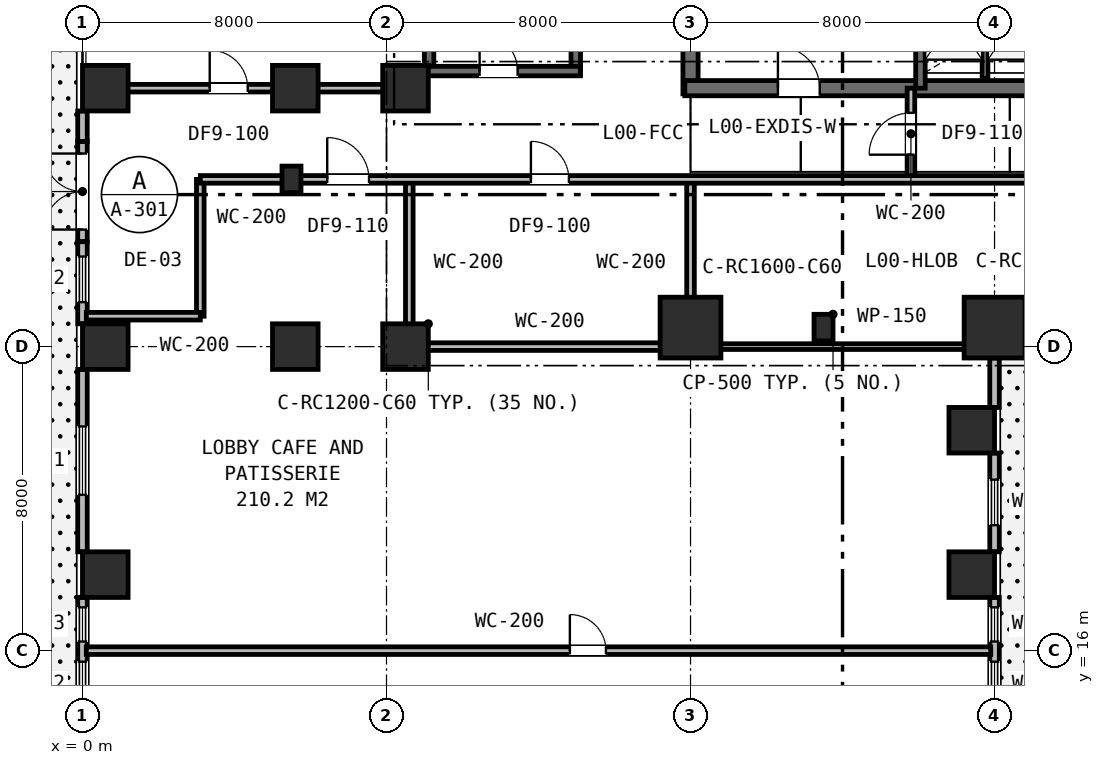
"""IFC4 building model, lengths in metres.
Left out: names, types, materials, properties, quantities, classifications, styles, units other than length and angle.
Written with IfcOpenShell. Run it as: python <this file> out.ifc"""

import sys

from ifc_helpers import new_model, si_unit, direction, frame, frame_2d, origin, origin_2d, place, context, subcontext, project, spatial, rectangle, extrude, element, fill, save


model = new_model("IFC4")
c1 = context("Model", 3, precision=1e-05, world=origin(), true_north=direction((0.0, 1.0)))
c2 = subcontext(c1, "Body", "Model", "MODEL_VIEW")
j1 = project(units=[si_unit("LENGTHUNIT", "METRE"), si_unit("PLANEANGLEUNIT", "RADIAN")], contexts=[c1])
p1 = place(None, origin())
s1 = spatial("IfcSite", under=j1, at=p1, CompositionType="ELEMENT")
p2 = place(p1, origin())
s2 = spatial("IfcBuilding", under=s1, at=p2, CompositionType="ELEMENT")
p3 = place(p2, origin())
s3 = spatial("IfcBuildingStorey", under=s2, at=p3, CompositionType="ELEMENT", Elevation=0.0)
p4 = place(p3, frame((16.0, 30.65, 0.0), z_axis=(0.0, 0.0, 1.0), x_axis=(0.0, 1.0, 0.0)))
e1 = element("IfcWall", 1, at=p4, inside=s3, PredefinedType="SHEAR", context=c2, shape_type="SweptSolid", body=[
    extrude(rectangle(XDim=12.3, YDim=0.4, at=frame_2d((6.15, 0.0))), origin(), (0.0, 0.0, 1.0), 6.0),
])
p5 = place(p3, frame((15.85, 30.8, 0.0), z_axis=(0.0, 0.0, 1.0), x_axis=(1.0, 0.0, 0.0)))
e2 = element("IfcWall", 2, at=p5, inside=s3, PredefinedType="SHEAR", context=c2, shape_type="SweptSolid", body=[
    extrude(rectangle(XDim=11.2, YDim=0.4, at=frame_2d((5.6, 0.0))), origin(), (0.0, 0.0, 1.0), 6.0),
])
p6 = place(p5, frame((2.45, 0.0, 0.0)))
e3 = element("IfcOpeningElement", 3, at=p6, cuts=e2, PredefinedType="OPENING", context=c2, shape_type="SweptSolid", body=[
    extrude(rectangle(XDim=1.1, YDim=2.15, at=frame_2d((0.55, 1.075))), frame((0.0, 0.21, 0.0), z_axis=(0.0, -1.0, 0.0), x_axis=(1.0, 0.0, 0.0)), (0.0, 0.0, 1.0), 0.42),
])
p7 = place(p3, frame((22.05, 30.8, 0.0), z_axis=(0.0, 0.0, 1.0), x_axis=(0.0, 1.0, 0.0)))
e4 = element("IfcWall", 4, at=p7, inside=s3, PredefinedType="SHEAR", context=c2, shape_type="SweptSolid", body=[
    extrude(rectangle(XDim=6.45, YDim=0.25, at=frame_2d((3.225, 0.0))), origin(), (0.0, 0.0, 1.0), 6.0),
])
for number, where, z_axis, x_axis in (
    (5, (9.12, 31.15, 0.0), (0.0, 0.0, 1.0), (0.0, 1.0, 0.0)),
    (6, (12.98, 31.15, 0.0), (0.0, 0.0, 1.0), (0.0, 1.0, 0.0)),
):
    element("IfcWall", number, at=place(p3, frame(where, z_axis=z_axis, x_axis=x_axis)), inside=s3, PredefinedType="SHEAR", context=c2, shape_type="SweptSolid", body=[
        extrude(rectangle(XDim=8.8, YDim=0.25, at=frame_2d((4.4, 0.0))), origin(), (0.0, 0.0, 1.0), 6.0),
    ])
p8 = place(p3, frame((9.0, 31.25, 0.0), z_axis=(0.0, 0.0, 1.0), x_axis=(1.0, 0.0, 0.0)))
e7 = element("IfcWall", 7, at=p8, inside=s3, PredefinedType="SHEAR", context=c2, shape_type="SweptSolid", body=[
    extrude(rectangle(XDim=4.1, YDim=0.25, at=frame_2d((2.05, 0.0))), origin(), (0.0, 0.0, 1.0), 6.0),
])
p9 = place(p8, frame((1.45, 0.0, 0.0)))
e8 = element("IfcOpeningElement", 8, at=p9, cuts=e7, PredefinedType="OPENING", context=c2, shape_type="SweptSolid", body=[
    extrude(rectangle(XDim=1.0, YDim=2.15, at=frame_2d((0.5, 1.075))), frame((0.0, 0.135, 0.0), z_axis=(0.0, -1.0, 0.0), x_axis=(1.0, 0.0, 0.0)), (0.0, 0.0, 1.0), 0.27),
])
p10 = place(p3, frame((8.5, 24.0, 0.0), z_axis=(0.0, 0.0, 1.0), x_axis=(1.0, 0.0, 0.0)))
e9 = element("IfcColumn", 9, at=p10, inside=s3, PredefinedType="COLUMN", context=c2, shape_type="SweptSolid", body=[
    extrude(rectangle(XDim=1.2, YDim=1.2, at=origin_2d()), origin(), (0.0, 0.0, 1.0), 6.0),
])
for number, where, z_axis, x_axis in (
    (10, (16.0, 24.5, 0.0), (0.0, 0.0, 1.0), (1.0, 0.0, 0.0)),
    (11, (24.0, 24.5, 0.0), (0.0, 0.0, 1.0), (1.0, 0.0, 0.0)),
):
    element("IfcColumn", number, at=place(p3, frame(where, z_axis=z_axis, x_axis=x_axis)), inside=s3, PredefinedType="COLUMN", context=c2, shape_type="SweptSolid", body=[
        extrude(rectangle(XDim=1.6, YDim=1.6, at=origin_2d()), origin(), (0.0, 0.0, 1.0), 6.0),
    ])
for number, where, z_axis, x_axis in (
    (12, (5.6, 24.0, 0.0), (0.0, 0.0, 1.0), (1.0, 0.0, 0.0)),
    (13, (5.6, 30.8, 0.0), (0.0, 0.0, 1.0), (1.0, 0.0, 0.0)),
    (14, (8.5, 30.8, 0.0), (0.0, 0.0, 1.0), (1.0, 0.0, 0.0)),
    (15, (0.6, 24.0, 0.0), (0.0, 0.0, 1.0), (1.0, 0.0, 0.0)),
    (16, (0.6, 30.8, 0.0), (0.0, 0.0, 1.0), (1.0, 0.0, 0.0)),
    (17, (0.6, 18.0, 0.0), (0.0, 0.0, 1.0), (1.0, 0.0, 0.0)),
    (18, (23.4, 18.0, 0.0), (0.0, 0.0, 1.0), (1.0, 0.0, 0.0)),
    (19, (23.4, 21.8, 0.0), (0.0, 0.0, 1.0), (1.0, 0.0, 0.0)),
):
    element("IfcColumn", number, at=place(p3, frame(where, z_axis=z_axis, x_axis=x_axis)), inside=s3, PredefinedType="COLUMN", context=c2, shape_type="SweptSolid", body=[
        extrude(rectangle(XDim=1.2, YDim=1.2, at=origin_2d()), origin(), (0.0, 0.0, 1.0), 6.0),
    ])
p11 = place(p3, frame((24.0, 14.2, 0.0), z_axis=(0.0, 0.0, 1.0), x_axis=(0.0, 1.0, 0.0)))
e20 = element("IfcWall", 20, at=p11, inside=s3, PredefinedType="STANDARD", context=c2, shape_type="SweptSolid", body=[
    extrude(rectangle(XDim=3.2, YDim=0.25, at=frame_2d((1.6, 0.0))), origin(), (0.0, 0.0, 1.0), 5.67),
])
p12 = place(p11, frame((0.31, 0.0, 0.85)))
e21 = element("IfcOpeningElement", 21, at=p12, cuts=e20, PredefinedType="OPENING", context=c2, shape_type="SweptSolid", body=[
    extrude(rectangle(XDim=1.2, YDim=1.6, at=frame_2d((0.6, 0.8))), frame((0.0, 0.135, 0.0), z_axis=(0.0, -1.0, 0.0), x_axis=(1.0, 0.0, 0.0)), (0.0, 0.0, 1.0), 0.27),
])
p13 = place(p11, frame((2.04, 0.0, 0.9)))
e22 = element("IfcOpeningElement", 22, at=p13, cuts=e20, PredefinedType="OPENING", context=c2, shape_type="SweptSolid", body=[
    extrude(rectangle(XDim=0.9, YDim=1.55, at=frame_2d((0.45, 0.775))), frame((0.0, 0.135, 0.0), z_axis=(0.0, -1.0, 0.0), x_axis=(1.0, 0.0, 0.0)), (0.0, 0.0, 1.0), 0.27),
])
p14 = place(p3, frame((24.0, 18.6, 0.0), z_axis=(0.0, 0.0, 1.0), x_axis=(0.0, 1.0, 0.0)))
e23 = element("IfcWall", 23, at=p14, inside=s3, PredefinedType="STANDARD", context=c2, shape_type="SweptSolid", body=[
    extrude(rectangle(XDim=2.6, YDim=0.25, at=frame_2d((1.3, 0.0))), origin(), (0.0, 0.0, 1.0), 5.67),
])
p15 = place(p14, frame((0.7, 0.0, 0.85)))
e24 = element("IfcOpeningElement", 24, at=p15, cuts=e23, PredefinedType="OPENING", context=c2, shape_type="SweptSolid", body=[
    extrude(rectangle(XDim=1.2, YDim=1.6, at=frame_2d((0.6, 0.8))), frame((0.0, 0.135, 0.0), z_axis=(0.0, -1.0, 0.0), x_axis=(1.0, 0.0, 0.0)), (0.0, 0.0, 1.0), 0.27),
])
p16 = place(p3, frame((24.0, 22.4, 0.0), z_axis=(0.0, 0.0, 1.0), x_axis=(0.0, 1.0, 0.0)))
e25 = element("IfcWall", 25, at=p16, inside=s3, PredefinedType="STANDARD", context=c2, shape_type="SweptSolid", body=[
    extrude(rectangle(XDim=1.3, YDim=0.25, at=frame_2d((0.65, 0.0))), origin(), (0.0, 0.0, 1.0), 5.67),
])
p17 = place(p3, frame((0.0, 26.76, 0.0), z_axis=(0.0, 0.0, 1.0), x_axis=(0.0, 1.0, 0.0)))
e26 = element("IfcWall", 26, at=p17, inside=s3, PredefinedType="STANDARD", context=c2, shape_type="SweptSolid", body=[
    extrude(rectangle(XDim=2.64, YDim=0.25, at=frame_2d((1.32, 0.0))), origin(), (0.0, 0.0, 1.0), 5.67),
])
p18 = place(p17, frame((0.32, 0.0, 0.0)))
e27 = element("IfcOpeningElement", 27, at=p18, cuts=e26, PredefinedType="OPENING", context=c2, shape_type="SweptSolid", body=[
    extrude(rectangle(XDim=2.0, YDim=2.4, at=frame_2d((1.0, 1.2))), frame((0.0, 0.135, 0.0), z_axis=(0.0, -1.0, 0.0), x_axis=(1.0, 0.0, 0.0)), (0.0, 0.0, 1.0), 0.27),
])
p19 = place(p3, frame((0.0, 30.2, 0.0), z_axis=(0.0, 0.0, 1.0), x_axis=(0.0, -1.0, 0.0)))
e28 = element("IfcWall", 28, at=p19, inside=s3, PredefinedType="STANDARD", context=c2, shape_type="SweptSolid", body=[
    extrude(rectangle(XDim=0.8, YDim=0.25, at=frame_2d((0.4, 0.0))), origin(), (0.0, 0.0, 1.0), 5.67),
])
p20 = place(p3, frame((0.0, 26.76, 0.0), z_axis=(0.0, 0.0, 1.0), x_axis=(0.0, -1.0, 0.0)))
e29 = element("IfcWall", 29, at=p20, inside=s3, PredefinedType="STANDARD", context=c2, shape_type="SweptSolid", body=[
    extrude(rectangle(XDim=2.16, YDim=0.25, at=frame_2d((1.08, 0.0))), origin(), (0.0, 0.0, 1.0), 5.67),
])
p21 = place(p20, frame((0.39, 0.0, 0.85)))
e30 = element("IfcOpeningElement", 30, at=p21, cuts=e29, PredefinedType="OPENING", context=c2, shape_type="SweptSolid", body=[
    extrude(rectangle(XDim=1.2, YDim=1.6, at=frame_2d((0.6, 0.8))), frame((0.0, 0.135, 0.0), z_axis=(0.0, -1.0, 0.0), x_axis=(1.0, 0.0, 0.0)), (0.0, 0.0, 1.0), 0.27),
])
p22 = place(p3, frame((0.0, 23.4, 0.0), z_axis=(0.0, 0.0, 1.0), x_axis=(0.0, -1.0, 0.0)))
e31 = element("IfcWall", 31, at=p22, inside=s3, PredefinedType="STANDARD", context=c2, shape_type="SweptSolid", body=[
    extrude(rectangle(XDim=4.8, YDim=0.25, at=frame_2d((2.4, 0.0))), origin(), (0.0, 0.0, 1.0), 5.67),
])
p23 = place(p22, frame((1.5, 0.0, 0.75)))
e32 = element("IfcOpeningElement", 32, at=p23, cuts=e31, PredefinedType="OPENING", context=c2, shape_type="SweptSolid", body=[
    extrude(rectangle(XDim=1.8, YDim=1.85, at=frame_2d((0.9, 0.925))), frame((0.0, 0.135, 0.0), z_axis=(0.0, -1.0, 0.0), x_axis=(1.0, 0.0, 0.0)), (0.0, 0.0, 1.0), 0.27),
])
p24 = place(p3, frame((0.0, 17.4, 0.0), z_axis=(0.0, 0.0, 1.0), x_axis=(0.0, -1.0, 0.0)))
e33 = element("IfcWall", 33, at=p24, inside=s3, PredefinedType="STANDARD", context=c2, shape_type="SweptSolid", body=[
    extrude(rectangle(XDim=3.2, YDim=0.25, at=frame_2d((1.6, 0.0))), origin(), (0.0, 0.0, 1.0), 5.67),
])
p25 = place(p24, frame((0.26, 0.0, 0.9)))
e34 = element("IfcOpeningElement", 34, at=p25, cuts=e33, PredefinedType="OPENING", context=c2, shape_type="SweptSolid", body=[
    extrude(rectangle(XDim=0.9, YDim=1.55, at=frame_2d((0.45, 0.775))), frame((0.0, 0.135, 0.0), z_axis=(0.0, -1.0, 0.0), x_axis=(1.0, 0.0, 0.0)), (0.0, 0.0, 1.0), 0.27),
])
p26 = place(p24, frame((1.69, 0.0, 0.85)))
e35 = element("IfcOpeningElement", 35, at=p26, cuts=e33, PredefinedType="OPENING", context=c2, shape_type="SweptSolid", body=[
    extrude(rectangle(XDim=1.2, YDim=1.6, at=frame_2d((0.6, 0.8))), frame((0.0, 0.135, 0.0), z_axis=(0.0, -1.0, 0.0), x_axis=(1.0, 0.0, 0.0)), (0.0, 0.0, 1.0), 0.27),
])
p27 = place(p3, frame((23.75, 31.05, 0.0), z_axis=(0.0, 0.0, 1.0), x_axis=(0.0, 1.0, 0.0)))
e36 = element("IfcWall", 36, at=p27, inside=s3, PredefinedType="PLUMBINGWALL", context=c2, shape_type="SweptSolid", body=[
    extrude(rectangle(XDim=3.1, YDim=0.15, at=frame_2d((1.55, 0.0))), origin(), (0.0, 0.0, 1.0), 5.67),
])
p28 = place(p3, frame((21.8, 28.4, 0.0), z_axis=(0.0, 0.0, 1.0), x_axis=(0.0, 1.0, 0.0)))
e37 = element("IfcWall", 37, at=p28, inside=s3, PredefinedType="PARTITIONING", context=c2, shape_type="SweptSolid", body=[
    extrude(rectangle(XDim=2.4, YDim=0.2, at=frame_2d((1.2, 0.0))), origin(), (0.0, 0.0, 1.0), 5.26),
])
p29 = place(p28, frame((0.65, 0.0, 0.0)))
e38 = element("IfcOpeningElement", 38, at=p29, cuts=e37, PredefinedType="OPENING", context=c2, shape_type="SweptSolid", body=[
    extrude(rectangle(XDim=1.1, YDim=2.15, at=frame_2d((0.55, 1.075))), frame((0.0, 0.11, 0.0), z_axis=(0.0, -1.0, 0.0), x_axis=(1.0, 0.0, 0.0)), (0.0, 0.0, 1.0), 0.22),
])
p30 = place(p3, frame((3.1, 24.8, 0.0), z_axis=(0.0, 0.0, 1.0), x_axis=(0.0, 1.0, 0.0)))
e39 = element("IfcWall", 39, at=p30, inside=s3, PredefinedType="PARTITIONING", context=c2, shape_type="SweptSolid", body=[
    extrude(rectangle(XDim=3.6, YDim=0.2, at=frame_2d((1.8, 0.0))), origin(), (0.0, 0.0, 1.0), 5.67),
])
p31 = place(p3, frame((0.1, 24.8, 0.0), z_axis=(0.0, 0.0, 1.0), x_axis=(1.0, 0.0, 0.0)))
e40 = element("IfcWall", 40, at=p31, inside=s3, PredefinedType="PARTITIONING", context=c2, shape_type="SweptSolid", body=[
    extrude(rectangle(XDim=3.0, YDim=0.2, at=frame_2d((1.5, 0.0))), origin(), (0.0, 0.0, 1.0), 5.21),
])
for number, where, z_axis, x_axis in (
    (41, (16.0, 24.0, 0.0), (0.0, 0.0, 1.0), (0.0, 1.0, 0.0)),
    (42, (8.6, 24.0, 0.0), (0.0, 0.0, 1.0), (0.0, 1.0, 0.0)),
):
    element("IfcWall", number, at=place(p3, frame(where, z_axis=z_axis, x_axis=x_axis)), inside=s3, PredefinedType="PARTITIONING", context=c2, shape_type="SweptSolid", body=[
        extrude(rectangle(XDim=4.4, YDim=0.2, at=frame_2d((2.2, 0.0))), origin(), (0.0, 0.0, 1.0), 5.02),
    ])
p32 = place(p3, frame((8.6, 24.0, 0.0), z_axis=(0.0, 0.0, 1.0), x_axis=(1.0, 0.0, 0.0)))
e43 = element("IfcWall", 43, at=p32, inside=s3, PredefinedType="PARTITIONING", context=c2, shape_type="SweptSolid", body=[
    extrude(rectangle(XDim=7.4, YDim=0.2, at=frame_2d((3.7, 0.0))), origin(), (0.0, 0.0, 1.0), 5.02),
])
p33 = place(p3, frame((3.1, 28.4, 0.0), z_axis=(0.0, 0.0, 1.0), x_axis=(1.0, 0.0, 0.0)))
e44 = element("IfcWall", 44, at=p33, inside=s3, PredefinedType="PARTITIONING", context=c2, shape_type="SweptSolid", body=[
    extrude(rectangle(XDim=52.8, YDim=0.2, at=frame_2d((26.4, 0.0))), origin(), (0.0, 0.0, 1.0), 5.02),
])
p34 = place(p33, frame((8.7, 0.0, 0.0)))
e45 = element("IfcOpeningElement", 45, at=p34, cuts=e44, PredefinedType="OPENING", context=c2, shape_type="SweptSolid", body=[
    extrude(rectangle(XDim=1.0, YDim=2.15, at=frame_2d((0.5, 1.075))), frame((0.0, 0.11, 0.0), z_axis=(0.0, -1.0, 0.0), x_axis=(1.0, 0.0, 0.0)), (0.0, 0.0, 1.0), 0.22),
])
p35 = place(p33, frame((23.25, 0.0, 0.0)))
e46 = element("IfcOpeningElement", 46, at=p35, cuts=e44, PredefinedType="OPENING", context=c2, shape_type="SweptSolid", body=[
    extrude(rectangle(XDim=1.1, YDim=2.15, at=frame_2d((0.55, 1.075))), frame((0.0, 0.11, 0.0), z_axis=(0.0, -1.0, 0.0), x_axis=(1.0, 0.0, 0.0)), (0.0, 0.0, 1.0), 0.22),
])
p36 = place(p33, frame((39.702, 0.0, 0.0)))
e47 = element("IfcOpeningElement", 47, at=p36, cuts=e44, PredefinedType="OPENING", context=c2, shape_type="SweptSolid", body=[
    extrude(rectangle(XDim=1.1, YDim=2.15, at=frame_2d((0.55, 1.075))), frame((0.0, 0.11, 0.0), z_axis=(0.0, -1.0, 0.0), x_axis=(1.0, 0.0, 0.0)), (0.0, 0.0, 1.0), 0.22),
])
p37 = place(p33, frame((3.34, 0.0, 0.0)))
e48 = element("IfcOpeningElement", 48, at=p37, cuts=e44, PredefinedType="OPENING", context=c2, shape_type="SweptSolid", body=[
    extrude(rectangle(XDim=1.1, YDim=2.15, at=frame_2d((0.55, 1.075))), frame((0.0, 0.11, 0.0), z_axis=(0.0, -1.0, 0.0), x_axis=(1.0, 0.0, 0.0)), (0.0, 0.0, 1.0), 0.22),
])
p38 = place(p3, frame((16.0, 24.0, 0.0), z_axis=(0.0, 0.0, 1.0), x_axis=(1.0, 0.0, 0.0)))
e49 = element("IfcWall", 49, at=p38, inside=s3, PredefinedType="PARTITIONING", context=c2, shape_type="SweptSolid", body=[
    extrude(rectangle(XDim=7.9, YDim=0.15, at=frame_2d((3.95, 0.0))), origin(), (0.0, 0.0, 1.0), 5.02),
])
p39 = place(p3, frame((0.1, 16.0, 0.0), z_axis=(0.0, 0.0, 1.0), x_axis=(1.0, 0.0, 0.0)))
e50 = element("IfcWall", 50, at=p39, inside=s3, PredefinedType="PARTITIONING", context=c2, shape_type="SweptSolid", body=[
    extrude(rectangle(XDim=23.8, YDim=0.2, at=frame_2d((11.9, 0.0))), origin(), (0.0, 0.0, 1.0), 5.42),
])
p40 = place(p39, frame((12.725, 0.0, 0.0)))
e51 = element("IfcOpeningElement", 51, at=p40, cuts=e50, PredefinedType="OPENING", context=c2, shape_type="SweptSolid", body=[
    extrude(rectangle(XDim=0.95, YDim=2.15, at=frame_2d((0.475, 1.075))), frame((0.0, 0.11, 0.0), z_axis=(0.0, -1.0, 0.0), x_axis=(1.0, 0.0, 0.0)), (0.0, 0.0, 1.0), 0.22),
])
p41 = place(p3, frame((0.1, 30.8, 0.0), z_axis=(0.0, 0.0, 1.0), x_axis=(1.0, 0.0, 0.0)))
e52 = element("IfcWall", 52, at=p41, inside=s3, PredefinedType="PARTITIONING", context=c2, shape_type="SweptSolid", body=[
    extrude(rectangle(XDim=8.9, YDim=0.2, at=frame_2d((4.45, 0.0))), origin(), (0.0, 0.0, 1.0), 5.02),
])
p42 = place(p41, frame((3.248, 0.0, 0.0)))
e53 = element("IfcOpeningElement", 53, at=p42, cuts=e52, PredefinedType="OPENING", context=c2, shape_type="SweptSolid", body=[
    extrude(rectangle(XDim=1.0, YDim=2.15, at=frame_2d((0.5, 1.075))), frame((0.0, 0.11, 0.0), z_axis=(0.0, -1.0, 0.0), x_axis=(1.0, 0.0, 0.0)), (0.0, 0.0, 1.0), 0.22),
])
for number, where, z_axis, x_axis in (
    (54, (19.5, 24.5, 0.0), (0.0, 0.0, 1.0), (1.0, 0.0, 0.0)),
    (55, (5.5, 28.4, 0.0), (0.0, 0.0, 1.0), (1.0, 0.0, 0.0)),
):
    element("IfcColumn", number, at=place(p3, frame(where, z_axis=z_axis, x_axis=x_axis)), inside=s3, PredefinedType="PILASTER", context=c2, shape_type="SweptSolid", body=[
        extrude(rectangle(XDim=0.5, YDim=0.7, at=origin_2d()), origin(), (0.0, 0.0, 1.0), 5.68),
    ])
p43 = place(p12, origin())
e56 = element("IfcWindow", 56, at=p43, inside=s3, PartitioningType="SINGLE_PANEL", PredefinedType="WINDOW", context=c2, shape_type="SweptSolid", body=[
    extrude(rectangle(XDim=1.2, YDim=1.6, at=frame_2d((0.6, 0.8))), frame((0.0, 0.03, 0.0), z_axis=(0.0, -1.0, 0.0), x_axis=(1.0, 0.0, 0.0)), (0.0, 0.0, 1.0), 0.06),
])
fill(e21, e56)
p44 = place(p13, origin())
e57 = element("IfcWindow", 57, at=p44, inside=s3, PartitioningType="SINGLE_PANEL", PredefinedType="WINDOW", context=c2, shape_type="SweptSolid", body=[
    extrude(rectangle(XDim=0.9, YDim=1.55, at=frame_2d((0.45, 0.775))), frame((0.0, 0.03, 0.0), z_axis=(0.0, -1.0, 0.0), x_axis=(1.0, 0.0, 0.0)), (0.0, 0.0, 1.0), 0.06),
])
fill(e22, e57)
p45 = place(p15, origin())
e58 = element("IfcWindow", 58, at=p45, inside=s3, PartitioningType="SINGLE_PANEL", PredefinedType="WINDOW", context=c2, shape_type="SweptSolid", body=[
    extrude(rectangle(XDim=1.2, YDim=1.6, at=frame_2d((0.6, 0.8))), frame((0.0, 0.03, 0.0), z_axis=(0.0, -1.0, 0.0), x_axis=(1.0, 0.0, 0.0)), (0.0, 0.0, 1.0), 0.06),
])
fill(e24, e58)
p46 = place(p18, origin())
e59 = element("IfcDoor", 59, at=p46, inside=s3, OperationType="DOUBLE_DOOR_SINGLE_SWING", PredefinedType="DOOR", context=c2, shape_type="SweptSolid", body=[
    extrude(rectangle(XDim=2.0, YDim=2.4, at=frame_2d((1.0, 1.2))), frame((0.0, 0.025, 0.0), z_axis=(0.0, -1.0, 0.0), x_axis=(1.0, 0.0, 0.0)), (0.0, 0.0, 1.0), 0.05),
])
fill(e27, e59)
p47 = place(p21, origin())
e60 = element("IfcWindow", 60, at=p47, inside=s3, PartitioningType="SINGLE_PANEL", PredefinedType="WINDOW", context=c2, shape_type="SweptSolid", body=[
    extrude(rectangle(XDim=1.2, YDim=1.6, at=frame_2d((0.6, 0.8))), frame((0.0, 0.03, 0.0), z_axis=(0.0, -1.0, 0.0), x_axis=(1.0, 0.0, 0.0)), (0.0, 0.0, 1.0), 0.06),
])
fill(e30, e60)
p48 = place(p23, origin())
e61 = element("IfcWindow", 61, at=p48, inside=s3, PartitioningType="SINGLE_PANEL", PredefinedType="WINDOW", context=c2, shape_type="SweptSolid", body=[
    extrude(rectangle(XDim=1.8, YDim=1.85, at=frame_2d((0.9, 0.925))), frame((0.0, 0.03, 0.0), z_axis=(0.0, -1.0, 0.0), x_axis=(1.0, 0.0, 0.0)), (0.0, 0.0, 1.0), 0.06),
])
fill(e32, e61)
p49 = place(p25, origin())
e62 = element("IfcWindow", 62, at=p49, inside=s3, PartitioningType="SINGLE_PANEL", PredefinedType="WINDOW", context=c2, shape_type="SweptSolid", body=[
    extrude(rectangle(XDim=0.9, YDim=1.55, at=frame_2d((0.45, 0.775))), frame((0.0, 0.03, 0.0), z_axis=(0.0, -1.0, 0.0), x_axis=(1.0, 0.0, 0.0)), (0.0, 0.0, 1.0), 0.06),
])
fill(e34, e62)
p50 = place(p26, origin())
e63 = element("IfcWindow", 63, at=p50, inside=s3, PartitioningType="SINGLE_PANEL", PredefinedType="WINDOW", context=c2, shape_type="SweptSolid", body=[
    extrude(rectangle(XDim=1.2, YDim=1.6, at=frame_2d((0.6, 0.8))), frame((0.0, 0.03, 0.0), z_axis=(0.0, -1.0, 0.0), x_axis=(1.0, 0.0, 0.0)), (0.0, 0.0, 1.0), 0.06),
])
fill(e35, e63)
p51 = place(p6, origin())
e64 = element("IfcDoor", 64, at=p51, inside=s3, OperationType="SINGLE_SWING_LEFT", PredefinedType="DOOR", context=c2, shape_type="SweptSolid", body=[
    extrude(rectangle(XDim=1.1, YDim=2.15, at=frame_2d((0.55, 1.075))), frame((0.0, 0.025, 0.0), z_axis=(0.0, -1.0, 0.0), x_axis=(1.0, 0.0, 0.0)), (0.0, 0.0, 1.0), 0.05),
])
fill(e3, e64)
p52 = place(p9, origin())
e65 = element("IfcDoor", 65, at=p52, inside=s3, OperationType="SINGLE_SWING_LEFT", PredefinedType="DOOR", context=c2, shape_type="SweptSolid", body=[
    extrude(rectangle(XDim=1.0, YDim=2.15, at=frame_2d((0.5, 1.075))), frame((0.0, 0.025, 0.0), z_axis=(0.0, -1.0, 0.0), x_axis=(1.0, 0.0, 0.0)), (0.0, 0.0, 1.0), 0.05),
])
fill(e8, e65)
p53 = place(p29, origin())
e66 = element("IfcDoor", 66, at=p53, inside=s3, OperationType="SINGLE_SWING_LEFT", PredefinedType="DOOR", context=c2, shape_type="SweptSolid", body=[
    extrude(rectangle(XDim=1.1, YDim=2.15, at=frame_2d((0.55, 1.075))), frame((0.0, 0.025, 0.0), z_axis=(0.0, -1.0, 0.0), x_axis=(1.0, 0.0, 0.0)), (0.0, 0.0, 1.0), 0.05),
])
fill(e38, e66)
p54 = place(p34, origin())
e67 = element("IfcDoor", 67, at=p54, inside=s3, OperationType="SINGLE_SWING_LEFT", PredefinedType="DOOR", context=c2, shape_type="SweptSolid", body=[
    extrude(rectangle(XDim=1.0, YDim=2.15, at=frame_2d((0.5, 1.075))), frame((0.0, 0.025, 0.0), z_axis=(0.0, -1.0, 0.0), x_axis=(1.0, 0.0, 0.0)), (0.0, 0.0, 1.0), 0.05),
])
fill(e45, e67)
p55 = place(p37, origin())
e68 = element("IfcDoor", 68, at=p55, inside=s3, OperationType="SINGLE_SWING_LEFT", PredefinedType="DOOR", context=c2, shape_type="SweptSolid", body=[
    extrude(rectangle(XDim=1.1, YDim=2.15, at=frame_2d((0.55, 1.075))), frame((0.0, 0.025, 0.0), z_axis=(0.0, -1.0, 0.0), x_axis=(1.0, 0.0, 0.0)), (0.0, 0.0, 1.0), 0.05),
])
fill(e48, e68)
p56 = place(p40, origin())
e69 = element("IfcDoor", 69, at=p56, inside=s3, OperationType="SINGLE_SWING_LEFT", PredefinedType="DOOR", context=c2, shape_type="SweptSolid", body=[
    extrude(rectangle(XDim=0.95, YDim=2.15, at=frame_2d((0.475, 1.075))), frame((0.0, 0.025, 0.0), z_axis=(0.0, -1.0, 0.0), x_axis=(1.0, 0.0, 0.0)), (0.0, 0.0, 1.0), 0.05),
])
fill(e51, e69)
p57 = place(p42, origin())
e70 = element("IfcDoor", 70, at=p57, inside=s3, OperationType="SINGLE_SWING_LEFT", PredefinedType="DOOR", context=c2, shape_type="SweptSolid", body=[
    extrude(rectangle(XDim=1.0, YDim=2.15, at=frame_2d((0.5, 1.075))), frame((0.0, 0.025, 0.0), z_axis=(0.0, -1.0, 0.0), x_axis=(1.0, 0.0, 0.0)), (0.0, 0.0, 1.0), 0.05),
])
fill(e53, e70)
save(model, sys.argv[1])
